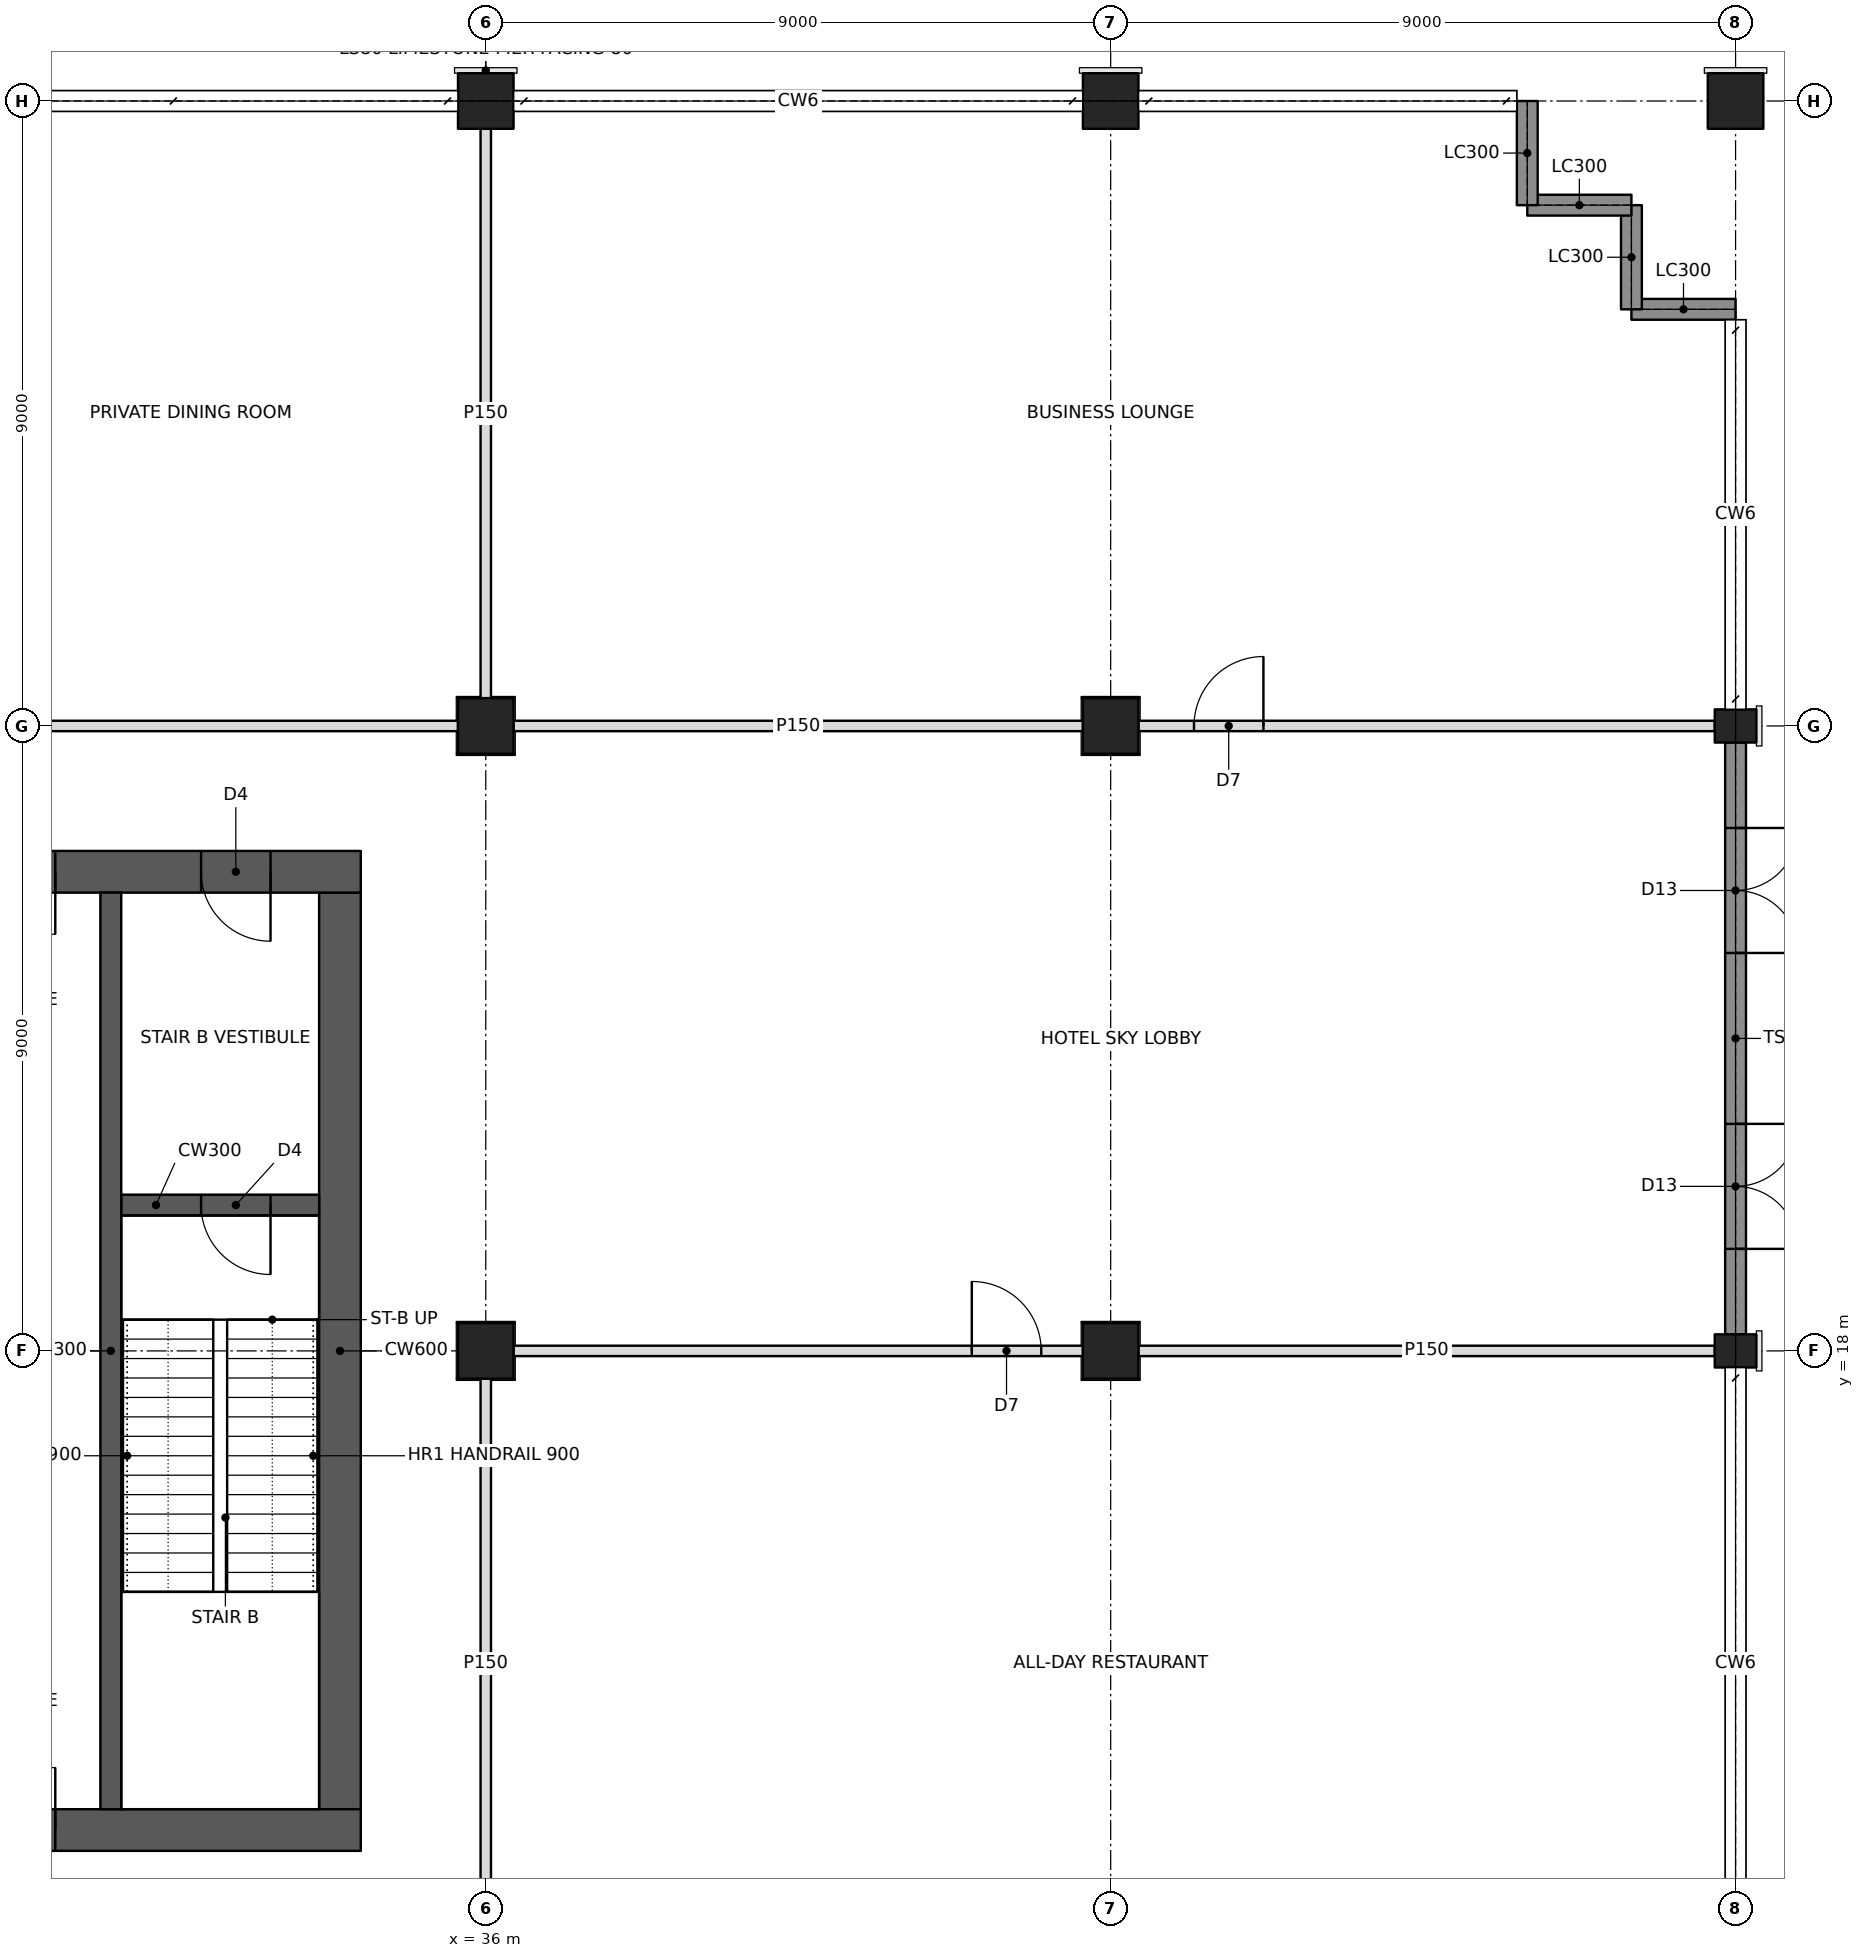
"""IFC4 building model, lengths in metres.
Left out: names, types, materials, properties, quantities, classifications, styles, units other than length and angle.
Written with IfcOpenShell. Run it as: python <this file> out.ifc"""

import sys

from ifc_helpers import new_model, si_unit, direction, frame, frame_2d, origin, origin_2d, place, context, subcontext, project, spatial, rectangle, hollow_rectangle, i_section, extrude, element, fill, save


model = new_model("IFC4")
c1 = context("Model", 3, precision=1e-05, world=origin(), true_north=direction((0.0, 1.0)))
c2 = subcontext(c1, "Body", "Model", "MODEL_VIEW")
j1 = project(units=[si_unit("LENGTHUNIT", "METRE"), si_unit("PLANEANGLEUNIT", "RADIAN")], contexts=[c1])
p1 = place(None, origin())
s1 = spatial("IfcSite", under=j1, at=p1, CompositionType="ELEMENT")
p2 = place(p1, origin())
s2 = spatial("IfcBuilding", under=s1, at=p2, CompositionType="ELEMENT")
p3 = place(p2, frame((0.0, 0.0, 23.0)))
s3 = spatial("IfcBuildingStorey", under=s2, at=p3, CompositionType="ELEMENT", Elevation=23.0)
for number, where, z_axis, x_axis in (
    (1, (36.0, 18.0, 0.0), (0.0, 0.0, 1.0), (0.0, 1.0, 0.0)),
    (2, (36.0, 27.0, 0.0), (0.0, 0.0, 1.0), (1.0, 0.0, 0.0)),
    (3, (36.0, 36.0, 0.0), (0.0, 0.0, 1.0), (1.0, 0.0, 0.0)),
    (4, (45.0, 18.0, 0.0), (0.0, 0.0, 1.0), (0.0, 1.0, 0.0)),
    (5, (45.0, 27.0, 0.0), (0.0, 0.0, 1.0), (0.0, 1.0, 0.0)),
    (6, (45.0, 36.0, 0.0), (0.0, 0.0, 1.0), (1.0, 0.0, 0.0)),
):
    element("IfcColumn", number, at=place(p3, frame(where, z_axis=z_axis, x_axis=x_axis)), inside=s3, PredefinedType="COLUMN", context=c2, shape_type="SweptSolid", body=[
        extrude(hollow_rectangle(XDim=0.8, YDim=0.8, WallThickness=0.1, at=origin_2d()), origin(), (0.0, 0.0, 1.0), 5.0),
    ])
for number, where, z_axis, x_axis in (
    (7, (54.0, 18.0, 0.0), (0.0, 0.0, 1.0), (0.0, 1.0, 0.0)),
    (8, (54.0, 27.0, 0.0), (0.0, 0.0, 1.0), (0.0, 1.0, 0.0)),
):
    element("IfcColumn", number, at=place(p3, frame(where, z_axis=z_axis, x_axis=x_axis)), inside=s3, PredefinedType="COLUMN", context=c2, shape_type="SweptSolid", body=[
        extrude(i_section(OverallWidth=0.478, OverallDepth=0.599, WebThickness=0.1, FlangeThickness=0.14, at=origin_2d()), origin(), (0.0, 0.0, 1.0), 5.0),
    ])
p4 = place(p3, frame((54.0, 36.0, 0.0), z_axis=(0.0, 0.0, 1.0), x_axis=(1.0, 0.0, 0.0)))
e9 = element("IfcColumn", 9, at=p4, inside=s3, PredefinedType="COLUMN", context=c2, shape_type="SweptSolid", body=[
    extrude(hollow_rectangle(XDim=0.8, YDim=0.8, WallThickness=0.1, at=origin_2d()), origin(), (0.0, 0.0, 1.0), 5.0),
])
p5 = place(p3, frame((10.8, 11.1, 0.0), z_axis=(0.0, 0.0, 1.0), x_axis=(1.0, 0.0, 0.0)))
e10 = element("IfcWall", 10, at=p5, inside=s3, PredefinedType="SHEAR", context=c2, shape_type="SweptSolid", body=[
    extrude(rectangle(XDim=23.4, YDim=0.6, at=frame_2d((11.7, 0.0))), origin(), (0.0, 0.0, 1.0), 5.0),
])
p6 = place(p5, frame((1.0, 0.0, 0.0)))
e11 = element("IfcOpeningElement", 11, at=p6, cuts=e10, PredefinedType="OPENING", context=c2, shape_type="SweptSolid", body=[
    extrude(rectangle(XDim=1.0, YDim=2.1, at=frame_2d((0.5, 1.05))), frame((0.0, 0.31, 0.0), z_axis=(0.0, -1.0, 0.0), x_axis=(1.0, 0.0, 0.0)), (0.0, 0.0, 1.0), 0.62),
])
p7 = place(p5, frame((17.2, 0.0, 0.0)))
e12 = element("IfcOpeningElement", 12, at=p7, cuts=e10, PredefinedType="OPENING", context=c2, shape_type="SweptSolid", body=[
    extrude(rectangle(XDim=1.8, YDim=2.1, at=frame_2d((0.9, 1.05))), frame((0.0, 0.31, 0.0), z_axis=(0.0, -1.0, 0.0), x_axis=(1.0, 0.0, 0.0)), (0.0, 0.0, 1.0), 0.62),
])
p8 = place(p3, frame((10.8, 24.9, 0.0), z_axis=(0.0, 0.0, 1.0), x_axis=(1.0, 0.0, 0.0)))
e13 = element("IfcWall", 13, at=p8, inside=s3, PredefinedType="SHEAR", context=c2, shape_type="SweptSolid", body=[
    extrude(rectangle(XDim=23.4, YDim=0.6, at=frame_2d((11.7, 0.0))), origin(), (0.0, 0.0, 1.0), 5.0),
])
p9 = place(p8, frame((17.2, 0.0, 0.0)))
e14 = element("IfcOpeningElement", 14, at=p9, cuts=e13, PredefinedType="OPENING", context=c2, shape_type="SweptSolid", body=[
    extrude(rectangle(XDim=1.8, YDim=2.1, at=frame_2d((0.9, 1.05))), frame((0.0, 0.31, 0.0), z_axis=(0.0, -1.0, 0.0), x_axis=(1.0, 0.0, 0.0)), (0.0, 0.0, 1.0), 0.62),
])
p10 = place(p8, frame((21.1, 0.0, 0.0)))
e15 = element("IfcOpeningElement", 15, at=p10, cuts=e13, PredefinedType="OPENING", context=c2, shape_type="SweptSolid", body=[
    extrude(rectangle(XDim=1.0, YDim=2.1, at=frame_2d((0.5, 1.05))), frame((0.0, 0.31, 0.0), z_axis=(0.0, -1.0, 0.0), x_axis=(1.0, 0.0, 0.0)), (0.0, 0.0, 1.0), 0.62),
])
p11 = place(p3, frame((33.9, 11.4, 0.0), z_axis=(0.0, 0.0, 1.0), x_axis=(0.0, 1.0, 0.0)))
e16 = element("IfcWall", 16, at=p11, inside=s3, PredefinedType="SHEAR", context=c2, shape_type="SweptSolid", body=[
    extrude(rectangle(XDim=13.2, YDim=0.6, at=frame_2d((6.6, 0.0))), origin(), (0.0, 0.0, 1.0), 5.0),
])
p12 = place(p3, frame((30.6, 11.4, 0.0), z_axis=(0.0, 0.0, 1.0), x_axis=(0.0, 1.0, 0.0)))
e17 = element("IfcWall", 17, at=p12, inside=s3, PredefinedType="SHEAR", context=c2, shape_type="SweptSolid", body=[
    extrude(rectangle(XDim=13.2, YDim=0.3, at=frame_2d((6.6, 0.0))), origin(), (0.0, 0.0, 1.0), 5.0),
])
p13 = place(p3, frame((30.75, 20.1, 0.0), z_axis=(0.0, 0.0, 1.0), x_axis=(1.0, 0.0, 0.0)))
e18 = element("IfcWall", 18, at=p13, inside=s3, PredefinedType="SHEAR", context=c2, shape_type="SweptSolid", body=[
    extrude(rectangle(XDim=2.85, YDim=0.3, at=frame_2d((1.425, 0.0))), origin(), (0.0, 0.0, 1.0), 5.0),
])
p14 = place(p13, frame((1.15, 0.0, 0.0)))
e19 = element("IfcOpeningElement", 19, at=p14, cuts=e18, PredefinedType="OPENING", context=c2, shape_type="SweptSolid", body=[
    extrude(rectangle(XDim=1.0, YDim=2.1, at=frame_2d((0.5, 1.05))), frame((0.0, 0.16, 0.0), z_axis=(0.0, -1.0, 0.0), x_axis=(1.0, 0.0, 0.0)), (0.0, 0.0, 1.0), 0.32),
])
p15 = place(p3, frame((54.0, 33.0, 0.0), z_axis=(0.0, 0.0, 1.0), x_axis=(-1.0, 0.0, 0.0)))
e20 = element("IfcWall", 20, at=p15, inside=s3, PredefinedType="SOLIDWALL", context=c2, shape_type="SweptSolid", body=[
    extrude(rectangle(XDim=1.5, YDim=0.3, at=frame_2d((0.75, 0.0))), origin(), (0.0, 0.0, 1.0), 4.02),
])
for number, where, z_axis, x_axis in (
    (21, (52.5, 33.0, 0.0), (0.0, 0.0, 1.0), (0.0, 1.0, 0.0)),
    (22, (52.5, 34.5, 0.0), (0.0, 0.0, 1.0), (-1.0, 0.0, 0.0)),
):
    element("IfcWall", number, at=place(p3, frame(where, z_axis=z_axis, x_axis=x_axis)), inside=s3, PredefinedType="SOLIDWALL", context=c2, shape_type="SweptSolid", body=[
        extrude(rectangle(XDim=1.5, YDim=0.3, at=frame_2d((0.75, 0.0))), origin(), (0.0, 0.0, 1.0), 4.8),
    ])
p16 = place(p3, frame((51.0, 34.5, 0.0), z_axis=(0.0, 0.0, 1.0), x_axis=(0.0, 1.0, 0.0)))
e23 = element("IfcWall", 23, at=p16, inside=s3, PredefinedType="SOLIDWALL", context=c2, shape_type="SweptSolid", body=[
    extrude(rectangle(XDim=1.5, YDim=0.3, at=frame_2d((0.75, 0.0))), origin(), (0.0, 0.0, 1.0), 4.02),
])
p17 = place(p3, frame((54.0, 18.239, 0.0), z_axis=(0.0, 0.0, 1.0), x_axis=(0.0, 1.0, 0.0)))
e24 = element("IfcWall", 24, at=p17, inside=s3, PredefinedType="SOLIDWALL", context=c2, shape_type="SweptSolid", body=[
    extrude(rectangle(XDim=8.522, YDim=0.3, at=frame_2d((4.261, 0.0))), origin(), (0.0, 0.0, 1.0), 4.02),
])
p18 = place(p17, frame((1.231, 0.0, 0.0)))
e25 = element("IfcOpeningElement", 25, at=p18, cuts=e24, PredefinedType="OPENING", context=c2, shape_type="SweptSolid", body=[
    extrude(rectangle(XDim=1.8, YDim=2.4, at=frame_2d((0.9, 1.2))), frame((0.0, 0.16, 0.0), z_axis=(0.0, -1.0, 0.0), x_axis=(1.0, 0.0, 0.0)), (0.0, 0.0, 1.0), 0.32),
])
p19 = place(p17, frame((5.492, 0.0, 0.0)))
e26 = element("IfcOpeningElement", 26, at=p19, cuts=e24, PredefinedType="OPENING", context=c2, shape_type="SweptSolid", body=[
    extrude(rectangle(XDim=1.8, YDim=2.4, at=frame_2d((0.9, 1.2))), frame((0.0, 0.16, 0.0), z_axis=(0.0, -1.0, 0.0), x_axis=(1.0, 0.0, 0.0)), (0.0, 0.0, 1.0), 0.32),
])
p20 = place(p3, frame((35.6, 27.0, 0.0), z_axis=(0.0, 0.0, 1.0), x_axis=(-1.0, 0.0, 0.0)))
e27 = element("IfcWall", 27, at=p20, inside=s3, PredefinedType="PARTITIONING", context=c2, shape_type="SweptSolid", body=[
    extrude(rectangle(XDim=8.1, YDim=0.15, at=frame_2d((4.05, 0.0))), origin(), (0.0, 0.0, 1.0), 4.005),
])
p21 = place(p3, frame((36.0, 9.4, 0.0), z_axis=(0.0, 0.0, 1.0), x_axis=(0.0, 1.0, 0.0)))
e28 = element("IfcWall", 28, at=p21, inside=s3, PredefinedType="PARTITIONING", context=c2, shape_type="SweptSolid", body=[
    extrude(rectangle(XDim=8.2, YDim=0.15, at=frame_2d((4.1, 0.0))), origin(), (0.0, 0.0, 1.0), 4.005),
])
p22 = place(p3, frame((36.4, 18.0, 0.0), z_axis=(0.0, 0.0, 1.0), x_axis=(1.0, 0.0, 0.0)))
e29 = element("IfcWall", 29, at=p22, inside=s3, PredefinedType="PARTITIONING", context=c2, shape_type="SweptSolid", body=[
    extrude(rectangle(XDim=8.2, YDim=0.15, at=frame_2d((4.1, 0.0))), origin(), (0.0, 0.0, 1.0), 4.005),
])
p23 = place(p22, frame((6.6, 0.0, 0.0)))
e30 = element("IfcOpeningElement", 30, at=p23, cuts=e29, PredefinedType="OPENING", context=c2, shape_type="SweptSolid", body=[
    extrude(rectangle(XDim=1.0, YDim=2.1, at=frame_2d((0.5, 1.05))), frame((0.0, 0.085, 0.0), z_axis=(0.0, -1.0, 0.0), x_axis=(1.0, 0.0, 0.0)), (0.0, 0.0, 1.0), 0.17),
])
p24 = place(p3, frame((45.4, 18.0, 0.0), z_axis=(0.0, 0.0, 1.0), x_axis=(1.0, 0.0, 0.0)))
e31 = element("IfcWall", 31, at=p24, inside=s3, PredefinedType="PARTITIONING", context=c2, shape_type="SweptSolid", body=[
    extrude(rectangle(XDim=8.3, YDim=0.15, at=frame_2d((4.15, 0.0))), origin(), (0.0, 0.0, 1.0), 4.038),
])
p25 = place(p3, frame((53.7, 27.0, 0.0), z_axis=(0.0, 0.0, 1.0), x_axis=(-1.0, 0.0, 0.0)))
e32 = element("IfcWall", 32, at=p25, inside=s3, PredefinedType="PARTITIONING", context=c2, shape_type="SweptSolid", body=[
    extrude(rectangle(XDim=8.3, YDim=0.15, at=frame_2d((4.15, 0.0))), origin(), (0.0, 0.0, 1.0), 4.038),
])
p26 = place(p25, frame((6.5, 0.0, 0.0)))
e33 = element("IfcOpeningElement", 33, at=p26, cuts=e32, PredefinedType="OPENING", context=c2, shape_type="SweptSolid", body=[
    extrude(rectangle(XDim=1.0, YDim=2.1, at=frame_2d((0.5, 1.05))), frame((0.0, 0.085, 0.0), z_axis=(0.0, -1.0, 0.0), x_axis=(1.0, 0.0, 0.0)), (0.0, 0.0, 1.0), 0.17),
])
for number, where, z_axis, x_axis in (
    (34, (44.6, 27.0, 0.0), (0.0, 0.0, 1.0), (-1.0, 0.0, 0.0)),
    (35, (36.0, 35.6, 0.0), (0.0, 0.0, 1.0), (0.0, -1.0, 0.0)),
):
    element("IfcWall", number, at=place(p3, frame(where, z_axis=z_axis, x_axis=x_axis)), inside=s3, PredefinedType="PARTITIONING", context=c2, shape_type="SweptSolid", body=[
        extrude(rectangle(XDim=8.2, YDim=0.15, at=frame_2d((4.1, 0.0))), origin(), (0.0, 0.0, 1.0), 4.038),
    ])
p27 = place(p18, frame((1.8, 0.0, 0.0), z_axis=(0.0, 0.0, 1.0), x_axis=(-1.0, 0.0, 0.0)))
e36 = element("IfcDoor", 36, at=p27, inside=s3, OperationType="DOUBLE_DOOR_SINGLE_SWING", PredefinedType="DOOR", context=c2, shape_type="SweptSolid", body=[
    extrude(rectangle(XDim=1.8, YDim=2.4, at=frame_2d((0.9, 1.2))), frame((0.0, 0.025, 0.0), z_axis=(0.0, -1.0, 0.0), x_axis=(1.0, 0.0, 0.0)), (0.0, 0.0, 1.0), 0.05),
])
fill(e25, e36)
p28 = place(p19, frame((1.8, 0.0, 0.0), z_axis=(0.0, 0.0, 1.0), x_axis=(-1.0, 0.0, 0.0)))
e37 = element("IfcDoor", 37, at=p28, inside=s3, OperationType="DOUBLE_DOOR_SINGLE_SWING", PredefinedType="DOOR", context=c2, shape_type="SweptSolid", body=[
    extrude(rectangle(XDim=1.8, YDim=2.4, at=frame_2d((0.9, 1.2))), frame((0.0, 0.025, 0.0), z_axis=(0.0, -1.0, 0.0), x_axis=(1.0, 0.0, 0.0)), (0.0, 0.0, 1.0), 0.05),
])
fill(e26, e37)
p29 = place(p23, origin())
e38 = element("IfcDoor", 38, at=p29, inside=s3, OperationType="SINGLE_SWING_LEFT", PredefinedType="DOOR", context=c2, shape_type="SweptSolid", body=[
    extrude(rectangle(XDim=1.0, YDim=2.1, at=frame_2d((0.5, 1.05))), frame((0.0, 0.025, 0.0), z_axis=(0.0, -1.0, 0.0), x_axis=(1.0, 0.0, 0.0)), (0.0, 0.0, 1.0), 0.05),
])
fill(e30, e38)
p30 = place(p26, frame((1.0, 0.0, 0.0), z_axis=(0.0, 0.0, 1.0), x_axis=(-1.0, 0.0, 0.0)))
e39 = element("IfcDoor", 39, at=p30, inside=s3, OperationType="SINGLE_SWING_RIGHT", PredefinedType="DOOR", context=c2, shape_type="SweptSolid", body=[
    extrude(rectangle(XDim=1.0, YDim=2.1, at=frame_2d((0.5, 1.05))), frame((0.0, 0.025, 0.0), z_axis=(0.0, -1.0, 0.0), x_axis=(1.0, 0.0, 0.0)), (0.0, 0.0, 1.0), 0.05),
])
fill(e33, e39)
p31 = place(p7, origin())
e40 = element("IfcDoor", 40, at=p31, inside=s3, OperationType="DOUBLE_DOOR_SINGLE_SWING", PredefinedType="DOOR", context=c2, shape_type="SweptSolid", body=[
    extrude(rectangle(XDim=1.8, YDim=2.1, at=frame_2d((0.9, 1.05))), frame((0.0, 0.025, 0.0), z_axis=(0.0, -1.0, 0.0), x_axis=(1.0, 0.0, 0.0)), (0.0, 0.0, 1.0), 0.05),
])
fill(e12, e40)
p32 = place(p9, frame((1.8, 0.0, 0.0), z_axis=(0.0, 0.0, 1.0), x_axis=(-1.0, 0.0, 0.0)))
e41 = element("IfcDoor", 41, at=p32, inside=s3, OperationType="DOUBLE_DOOR_SINGLE_SWING", PredefinedType="DOOR", context=c2, shape_type="SweptSolid", body=[
    extrude(rectangle(XDim=1.8, YDim=2.1, at=frame_2d((0.9, 1.05))), frame((0.0, 0.025, 0.0), z_axis=(0.0, -1.0, 0.0), x_axis=(1.0, 0.0, 0.0)), (0.0, 0.0, 1.0), 0.05),
])
fill(e14, e41)
p33 = place(p10, frame((1.0, 0.0, 0.0), z_axis=(0.0, 0.0, 1.0), x_axis=(-1.0, 0.0, 0.0)))
e42 = element("IfcDoor", 42, at=p33, inside=s3, OperationType="SINGLE_SWING_LEFT", PredefinedType="DOOR", context=c2, shape_type="SweptSolid", body=[
    extrude(rectangle(XDim=1.0, YDim=2.1, at=frame_2d((0.5, 1.05))), frame((0.0, 0.025, 0.0), z_axis=(0.0, -1.0, 0.0), x_axis=(1.0, 0.0, 0.0)), (0.0, 0.0, 1.0), 0.05),
])
fill(e15, e42)
p34 = place(p14, frame((1.0, 0.0, 0.0), z_axis=(0.0, 0.0, 1.0), x_axis=(-1.0, 0.0, 0.0)))
e43 = element("IfcDoor", 43, at=p34, inside=s3, OperationType="SINGLE_SWING_LEFT", PredefinedType="DOOR", context=c2, shape_type="SweptSolid", body=[
    extrude(rectangle(XDim=1.0, YDim=2.1, at=frame_2d((0.5, 1.05))), frame((0.0, 0.025, 0.0), z_axis=(0.0, -1.0, 0.0), x_axis=(1.0, 0.0, 0.0)), (0.0, 0.0, 1.0), 0.05),
])
fill(e19, e43)
save(model, sys.argv[1])
